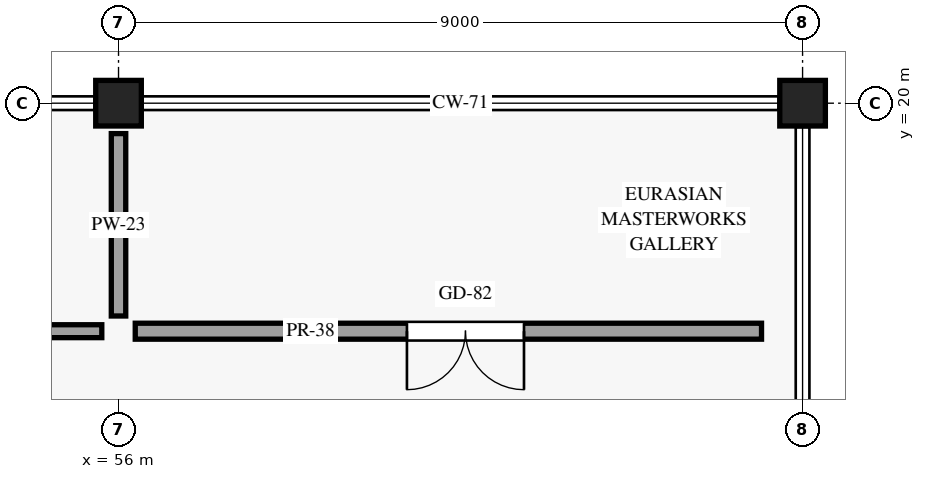
"""IFC4 building model, lengths in metres.
Left out: names, types, materials, properties, quantities, classifications, styles, units other than length and angle.
Written with IfcOpenShell. Run it as: python <this file> out.ifc"""

import sys

from ifc_helpers import new_model, si_unit, direction, frame, frame_2d, origin, origin_2d, place, context, subcontext, project, spatial, rectangle, extrude, element, fill, save


model = new_model("IFC4")
c1 = context("Model", 3, precision=1e-05, world=origin(), true_north=direction((0.0, 1.0)))
c2 = subcontext(c1, "Body", "Model", "MODEL_VIEW")
j1 = project(units=[si_unit("LENGTHUNIT", "METRE"), si_unit("PLANEANGLEUNIT", "RADIAN")], contexts=[c1])
p1 = place(None, origin())
s1 = spatial("IfcSite", under=j1, at=p1, CompositionType="ELEMENT")
p2 = place(p1, origin())
s2 = spatial("IfcBuilding", under=s1, at=p2, CompositionType="ELEMENT")
p3 = place(p2, frame((0.0, 0.0, 19.5)))
s3 = spatial("IfcBuildingStorey", under=s2, at=p3, CompositionType="ELEMENT", Elevation=19.5)
for number, where, z_axis, x_axis in (
    (1, (56.0, 20.0, 0.0), (0.0, 0.0, 1.0), (1.0, 0.0, 0.0)),
    (2, (65.0, 20.0, 0.0), (0.0, 0.0, 1.0), (1.0, 0.0, 0.0)),
):
    element("IfcColumn", number, at=place(p3, frame(where, z_axis=z_axis, x_axis=x_axis)), inside=s3, PredefinedType="COLUMN", context=c2, shape_type="SweptSolid", body=[
        extrude(rectangle(XDim=0.6, YDim=0.6, at=origin_2d()), origin(), (0.0, 0.0, 1.0), 4.5),
    ])
p4 = place(p3, frame((38.22, 17.0, 0.0), z_axis=(0.0, 0.0, 1.0), x_axis=(1.0, 0.0, 0.0)))
e3 = element("IfcWall", 3, at=p4, inside=s3, PredefinedType="PARTITIONING", context=c2, shape_type="SweptSolid", body=[
    extrude(rectangle(XDim=17.56, YDim=0.17, at=frame_2d((8.78, 0.0))), origin(), (0.0, 0.0, 1.0), 3.715),
])
p5 = place(p4, frame((13.776, 0.0, 0.0), z_axis=(0.0, 0.0, 1.0), x_axis=(-1.0, 0.0, 0.0)))
e4 = element("IfcOpeningElement", 4, at=p5, cuts=e3, PredefinedType="OPENING", context=c2, shape_type="SweptSolid", body=[
    extrude(rectangle(XDim=0.95, YDim=2.15, at=frame_2d((0.475, 1.075))), frame((0.0, 0.095, 0.0), z_axis=(0.0, -1.0, 0.0), x_axis=(1.0, 0.0, 0.0)), (0.0, 0.0, 1.0), 0.19),
])
p6 = place(p3, frame((56.0, 17.2, 0.0), z_axis=(0.0, 0.0, 1.0), x_axis=(0.0, 1.0, 0.0)))
e5 = element("IfcWall", 5, at=p6, inside=s3, PredefinedType="PARTITIONING", context=c2, shape_type="SweptSolid", body=[
    extrude(rectangle(XDim=2.4, YDim=0.19, at=frame_2d((1.2, 0.0))), origin(), (0.0, 0.0, 1.0), 3.715),
])
p7 = place(p3, frame((56.22, 17.0, 0.0), z_axis=(0.0, 0.0, 1.0), x_axis=(1.0, 0.0, 0.0)))
e6 = element("IfcWall", 6, at=p7, inside=s3, PredefinedType="PARTITIONING", context=c2, shape_type="SweptSolid", body=[
    extrude(rectangle(XDim=8.24, YDim=0.21, at=frame_2d((4.12, 0.0))), origin(), (0.0, 0.0, 1.0), 3.715),
])
p8 = place(p7, frame((5.115, 0.0, 0.0), z_axis=(0.0, 0.0, 1.0), x_axis=(-1.0, 0.0, 0.0)))
e7 = element("IfcOpeningElement", 7, at=p8, cuts=e6, PredefinedType="OPENING", context=c2, shape_type="SweptSolid", body=[
    extrude(rectangle(XDim=1.54, YDim=2.36, at=frame_2d((0.77, 1.18))), frame((0.0, 0.115, 0.0), z_axis=(0.0, -1.0, 0.0), x_axis=(1.0, 0.0, 0.0)), (0.0, 0.0, 1.0), 0.23),
])
p9 = place(p8, origin())
e8 = element("IfcDoor", 8, at=p9, inside=s3, OperationType="DOUBLE_DOOR_SINGLE_SWING", PredefinedType="DOOR", context=c2, shape_type="SweptSolid", body=[
    extrude(rectangle(XDim=1.54, YDim=2.36, at=frame_2d((0.77, 1.18))), frame((0.0, 0.025, 0.0), z_axis=(0.0, -1.0, 0.0), x_axis=(1.0, 0.0, 0.0)), (0.0, 0.0, 1.0), 0.05),
])
fill(e7, e8)
save(model, sys.argv[1])
